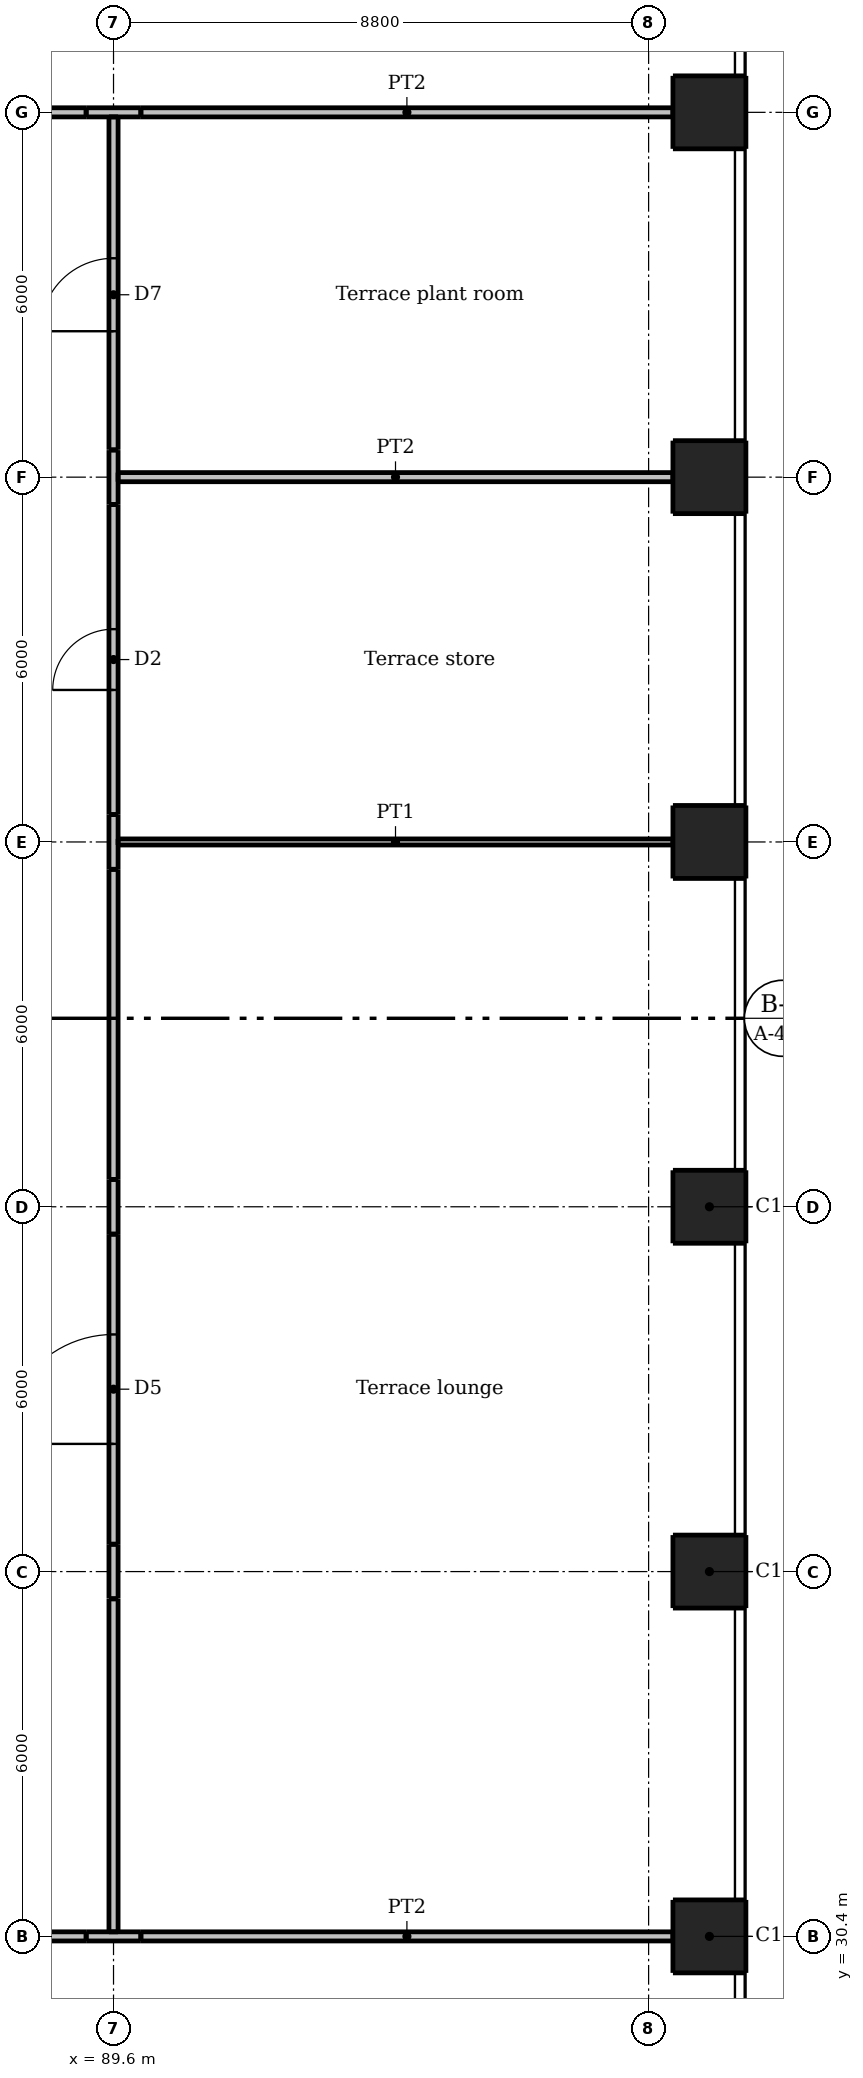
"""IFC4 building model, lengths in metres.
Left out: names, types, materials, properties, quantities, classifications, styles, units other than length and angle.
Written with IfcOpenShell. Run it as: python <this file> out.ifc"""

import sys

from ifc_helpers import new_model, si_unit, direction, frame, frame_2d, origin, origin_2d, place, context, subcontext, project, spatial, rectangle, extrude, element, fill, save


model = new_model("IFC4")
c1 = context("Model", 3, precision=1e-05, world=origin(), true_north=direction((0.0, 1.0)))
c2 = subcontext(c1, "Body", "Model", "MODEL_VIEW")
j1 = project(units=[si_unit("LENGTHUNIT", "METRE"), si_unit("PLANEANGLEUNIT", "RADIAN")], contexts=[c1])
p1 = place(None, origin())
s1 = spatial("IfcSite", under=j1, at=p1, CompositionType="ELEMENT")
p2 = place(p1, origin())
s2 = spatial("IfcBuilding", under=s1, at=p2, CompositionType="ELEMENT")
p3 = place(p2, frame((0.0, 0.0, 19.0)))
s3 = spatial("IfcBuildingStorey", under=s2, at=p3, CompositionType="ELEMENT", Elevation=19.0)
p4 = place(p3, frame((99.4, 30.4, 0.0), z_axis=(0.0, 0.0, 1.0), x_axis=(1.0, 0.0, 0.0)))
e1 = element("IfcColumn", 1, at=p4, inside=s3, PredefinedType="COLUMN", context=c2, shape_type="SweptSolid", body=[
    extrude(rectangle(XDim=1.2, YDim=1.2, at=origin_2d()), origin(), (0.0, 0.0, 1.0), 4.25),
])
for number, where, z_axis, x_axis in (
    (2, (99.4, 36.4, 0.0), (0.0, 0.0, 1.0), (1.0, 0.0, 0.0)),
    (3, (99.4, 42.4, 0.0), (0.0, 0.0, 1.0), (1.0, 0.0, 0.0)),
    (4, (99.4, 48.4, 0.0), (0.0, 0.0, 1.0), (1.0, 0.0, 0.0)),
):
    element("IfcColumn", number, at=place(p3, frame(where, z_axis=z_axis, x_axis=x_axis)), inside=s3, PredefinedType="COLUMN", context=c2, shape_type="SweptSolid", body=[
        extrude(rectangle(XDim=1.2, YDim=1.2, at=origin_2d()), origin(), (0.0, 0.0, 1.0), 4.5),
    ])
for number, where, z_axis, x_axis in (
    (5, (99.4, 54.4, 0.0), (0.0, 0.0, 1.0), (1.0, 0.0, 0.0)),
    (6, (99.4, 60.4, 0.0), (0.0, 0.0, 1.0), (1.0, 0.0, 0.0)),
):
    element("IfcColumn", number, at=place(p3, frame(where, z_axis=z_axis, x_axis=x_axis)), inside=s3, PredefinedType="COLUMN", context=c2, shape_type="SweptSolid", body=[
        extrude(rectangle(XDim=1.2, YDim=1.2, at=origin_2d()), origin(), (0.0, 0.0, 1.0), 4.25),
    ])
p5 = place(p3, frame((84.05, 30.4, 0.0), z_axis=(0.0, 0.0, 1.0), x_axis=(1.0, 0.0, 0.0)))
e7 = element("IfcWall", 7, at=p5, inside=s3, PredefinedType="PARTITIONING", context=c2, shape_type="SweptSolid", body=[
    extrude(rectangle(XDim=5.1, YDim=0.15, at=frame_2d((2.55, 0.0))), origin(), (0.0, 0.0, 1.0), 4.25),
])
p6 = place(p5, frame((0.15, 0.0, 0.0)))
e8 = element("IfcOpeningElement", 8, at=p6, cuts=e7, PredefinedType="OPENING", context=c2, shape_type="SweptSolid", body=[
    extrude(rectangle(XDim=1.8, YDim=2.1, at=frame_2d((0.9, 1.05))), frame((0.0, 0.085, 0.0), z_axis=(0.0, -1.0, 0.0), x_axis=(1.0, 0.0, 0.0)), (0.0, 0.0, 1.0), 0.17),
])
p7 = place(p3, frame((89.15, 30.4, 0.0), z_axis=(0.0, 0.0, 1.0), x_axis=(1.0, 0.0, 0.0)))
e9 = element("IfcWall", 9, at=p7, inside=s3, PredefinedType="PARTITIONING", context=c2, shape_type="SweptSolid", body=[
    extrude(rectangle(XDim=0.9, YDim=0.15, at=frame_2d((0.45, 0.0))), origin(), (0.0, 0.0, 1.0), 2.947),
])
p8 = place(p3, frame((90.05, 30.4, 0.0), z_axis=(0.0, 0.0, 1.0), x_axis=(1.0, 0.0, 0.0)))
e10 = element("IfcWall", 10, at=p8, inside=s3, PredefinedType="PARTITIONING", context=c2, shape_type="SweptSolid", body=[
    extrude(rectangle(XDim=8.75, YDim=0.15, at=frame_2d((4.375, 0.0))), origin(), (0.0, 0.0, 1.0), 3.415),
])
p9 = place(p3, frame((89.675, 48.4, 0.0), z_axis=(0.0, 0.0, 1.0), x_axis=(1.0, 0.0, 0.0)))
e11 = element("IfcWall", 11, at=p9, inside=s3, PredefinedType="PARTITIONING", context=c2, shape_type="SweptSolid", body=[
    extrude(rectangle(XDim=9.125, YDim=0.1, at=frame_2d((4.562, 0.0))), origin(), (0.0, 0.0, 1.0), 2.95),
])
p10 = place(p3, frame((89.675, 54.4, 0.0), z_axis=(0.0, 0.0, 1.0), x_axis=(1.0, 0.0, 0.0)))
e12 = element("IfcWall", 12, at=p10, inside=s3, PredefinedType="PARTITIONING", context=c2, shape_type="SweptSolid", body=[
    extrude(rectangle(XDim=9.125, YDim=0.15, at=frame_2d((4.562, 0.0))), origin(), (0.0, 0.0, 1.0), 2.944),
])
p11 = place(p3, frame((83.746, 60.4, 0.0), z_axis=(0.0, 0.0, 1.0), x_axis=(1.0, 0.0, 0.0)))
e13 = element("IfcWall", 13, at=p11, inside=s3, PredefinedType="PARTITIONING", context=c2, shape_type="SweptSolid", body=[
    extrude(rectangle(XDim=5.404, YDim=0.15, at=frame_2d((2.702, 0.0))), origin(), (0.0, 0.0, 1.0), 4.25),
])
p12 = place(p11, frame((2.354, 0.0, 0.0)))
e14 = element("IfcOpeningElement", 14, at=p12, cuts=e13, PredefinedType="OPENING", context=c2, shape_type="SweptSolid", body=[
    extrude(rectangle(XDim=1.0, YDim=2.1, at=frame_2d((0.5, 1.05))), frame((0.0, 0.085, 0.0), z_axis=(0.0, -1.0, 0.0), x_axis=(1.0, 0.0, 0.0)), (0.0, 0.0, 1.0), 0.17),
])
p13 = place(p3, frame((89.15, 60.4, 0.0), z_axis=(0.0, 0.0, 1.0), x_axis=(1.0, 0.0, 0.0)))
e15 = element("IfcWall", 15, at=p13, inside=s3, PredefinedType="PARTITIONING", context=c2, shape_type="SweptSolid", body=[
    extrude(rectangle(XDim=0.9, YDim=0.15, at=frame_2d((0.45, 0.0))), origin(), (0.0, 0.0, 1.0), 2.947),
])
p14 = place(p3, frame((90.05, 60.4, 0.0), z_axis=(0.0, 0.0, 1.0), x_axis=(1.0, 0.0, 0.0)))
e16 = element("IfcWall", 16, at=p14, inside=s3, PredefinedType="PARTITIONING", context=c2, shape_type="SweptSolid", body=[
    extrude(rectangle(XDim=8.75, YDim=0.15, at=frame_2d((4.375, 0.0))), origin(), (0.0, 0.0, 1.0), 3.415),
])
p15 = place(p3, frame((89.6, 30.475, 0.0), z_axis=(0.0, 0.0, 1.0), x_axis=(0.0, 1.0, 0.0)))
e17 = element("IfcWall", 17, at=p15, inside=s3, PredefinedType="PARTITIONING", context=c2, shape_type="SweptSolid", body=[
    extrude(rectangle(XDim=5.475, YDim=0.15, at=frame_2d((2.737, 0.0))), origin(), (0.0, 0.0, 1.0), 2.947),
])
p16 = place(p3, frame((89.6, 35.955, 0.0), z_axis=(0.0, 0.0, 1.0), x_axis=(0.0, 1.0, 0.0)))
e18 = element("IfcWall", 18, at=p16, inside=s3, PredefinedType="PARTITIONING", context=c2, shape_type="SweptSolid", body=[
    extrude(rectangle(XDim=0.895, YDim=0.15, at=frame_2d((0.448, 0.0))), origin(), (0.0, 0.0, 1.0), 2.944),
])
p17 = place(p3, frame((89.6, 36.85, 0.0), z_axis=(0.0, 0.0, 1.0), x_axis=(0.0, 1.0, 0.0)))
e19 = element("IfcWall", 19, at=p17, inside=s3, PredefinedType="PARTITIONING", context=c2, shape_type="SweptSolid", body=[
    extrude(rectangle(XDim=5.1, YDim=0.15, at=frame_2d((2.55, 0.0))), origin(), (0.0, 0.0, 1.0), 4.25),
])
p18 = place(p17, frame((1.65, 0.0, 0.0)))
e20 = element("IfcOpeningElement", 20, at=p18, cuts=e19, PredefinedType="OPENING", context=c2, shape_type="SweptSolid", body=[
    extrude(rectangle(XDim=1.8, YDim=2.1, at=frame_2d((0.9, 1.05))), frame((0.0, 0.085, 0.0), z_axis=(0.0, -1.0, 0.0), x_axis=(1.0, 0.0, 0.0)), (0.0, 0.0, 1.0), 0.17),
])
p19 = place(p3, frame((89.6, 41.95, 0.0), z_axis=(0.0, 0.0, 1.0), x_axis=(0.0, 1.0, 0.0)))
e21 = element("IfcWall", 21, at=p19, inside=s3, PredefinedType="PARTITIONING", context=c2, shape_type="SweptSolid", body=[
    extrude(rectangle(XDim=0.9, YDim=0.15, at=frame_2d((0.45, 0.0))), origin(), (0.0, 0.0, 1.0), 2.95),
])
p20 = place(p3, frame((89.6, 42.85, 0.0), z_axis=(0.0, 0.0, 1.0), x_axis=(0.0, 1.0, 0.0)))
e22 = element("IfcWall", 22, at=p20, inside=s3, PredefinedType="PARTITIONING", context=c2, shape_type="SweptSolid", body=[
    extrude(rectangle(XDim=5.1, YDim=0.15, at=frame_2d((2.55, 0.0))), origin(), (0.0, 0.0, 1.0), 4.25),
])
p21 = place(p3, frame((89.6, 47.95, 0.0), z_axis=(0.0, 0.0, 1.0), x_axis=(0.0, 1.0, 0.0)))
e23 = element("IfcWall", 23, at=p21, inside=s3, PredefinedType="PARTITIONING", context=c2, shape_type="SweptSolid", body=[
    extrude(rectangle(XDim=0.9, YDim=0.15, at=frame_2d((0.45, 0.0))), origin(), (0.0, 0.0, 1.0), 2.95),
])
p22 = place(p3, frame((89.6, 48.85, 0.0), z_axis=(0.0, 0.0, 1.0), x_axis=(0.0, 1.0, 0.0)))
e24 = element("IfcWall", 24, at=p22, inside=s3, PredefinedType="PARTITIONING", context=c2, shape_type="SweptSolid", body=[
    extrude(rectangle(XDim=5.1, YDim=0.15, at=frame_2d((2.55, 0.0))), origin(), (0.0, 0.0, 1.0), 4.25),
])
p23 = place(p22, frame((2.05, 0.0, 0.0)))
e25 = element("IfcOpeningElement", 25, at=p23, cuts=e24, PredefinedType="OPENING", context=c2, shape_type="SweptSolid", body=[
    extrude(rectangle(XDim=1.0, YDim=2.1, at=frame_2d((0.5, 1.05))), frame((0.0, 0.085, 0.0), z_axis=(0.0, -1.0, 0.0), x_axis=(1.0, 0.0, 0.0)), (0.0, 0.0, 1.0), 0.17),
])
p24 = place(p3, frame((89.6, 53.95, 0.0), z_axis=(0.0, 0.0, 1.0), x_axis=(0.0, 1.0, 0.0)))
e26 = element("IfcWall", 26, at=p24, inside=s3, PredefinedType="PARTITIONING", context=c2, shape_type="SweptSolid", body=[
    extrude(rectangle(XDim=0.895, YDim=0.15, at=frame_2d((0.448, 0.0))), origin(), (0.0, 0.0, 1.0), 2.944),
])
p25 = place(p3, frame((89.6, 54.85, 0.0), z_axis=(0.0, 0.0, 1.0), x_axis=(0.0, 1.0, 0.0)))
e27 = element("IfcWall", 27, at=p25, inside=s3, PredefinedType="PARTITIONING", context=c2, shape_type="SweptSolid", body=[
    extrude(rectangle(XDim=5.475, YDim=0.15, at=frame_2d((2.737, 0.0))), origin(), (0.0, 0.0, 1.0), 2.947),
])
p26 = place(p25, frame((1.95, 0.0, 0.0)))
e28 = element("IfcOpeningElement", 28, at=p26, cuts=e27, PredefinedType="OPENING", context=c2, shape_type="SweptSolid", body=[
    extrude(rectangle(XDim=1.2, YDim=2.1, at=frame_2d((0.6, 1.05))), frame((0.0, 0.085, 0.0), z_axis=(0.0, -1.0, 0.0), x_axis=(1.0, 0.0, 0.0)), (0.0, 0.0, 1.0), 0.17),
])
p27 = place(p18, origin())
e29 = element("IfcDoor", 29, at=p27, inside=s3, OperationType="DOUBLE_DOOR_SINGLE_SWING", PredefinedType="DOOR", context=c2, shape_type="SweptSolid", body=[
    extrude(rectangle(XDim=1.8, YDim=2.1, at=frame_2d((0.9, 1.05))), frame((0.0, 0.025, 0.0), z_axis=(0.0, -1.0, 0.0), x_axis=(1.0, 0.0, 0.0)), (0.0, 0.0, 1.0), 0.05),
])
fill(e20, e29)
p28 = place(p23, origin())
e30 = element("IfcDoor", 30, at=p28, inside=s3, OperationType="SINGLE_SWING_LEFT", PredefinedType="DOOR", context=c2, shape_type="SweptSolid", body=[
    extrude(rectangle(XDim=1.0, YDim=2.1, at=frame_2d((0.5, 1.05))), frame((0.0, 0.025, 0.0), z_axis=(0.0, -1.0, 0.0), x_axis=(1.0, 0.0, 0.0)), (0.0, 0.0, 1.0), 0.05),
])
fill(e25, e30)
p29 = place(p26, origin())
e31 = element("IfcDoor", 31, at=p29, inside=s3, OperationType="SINGLE_SWING_LEFT", PredefinedType="DOOR", context=c2, shape_type="SweptSolid", body=[
    extrude(rectangle(XDim=1.2, YDim=2.1, at=frame_2d((0.6, 1.05))), frame((0.0, 0.025, 0.0), z_axis=(0.0, -1.0, 0.0), x_axis=(1.0, 0.0, 0.0)), (0.0, 0.0, 1.0), 0.05),
])
fill(e28, e31)
save(model, sys.argv[1])
